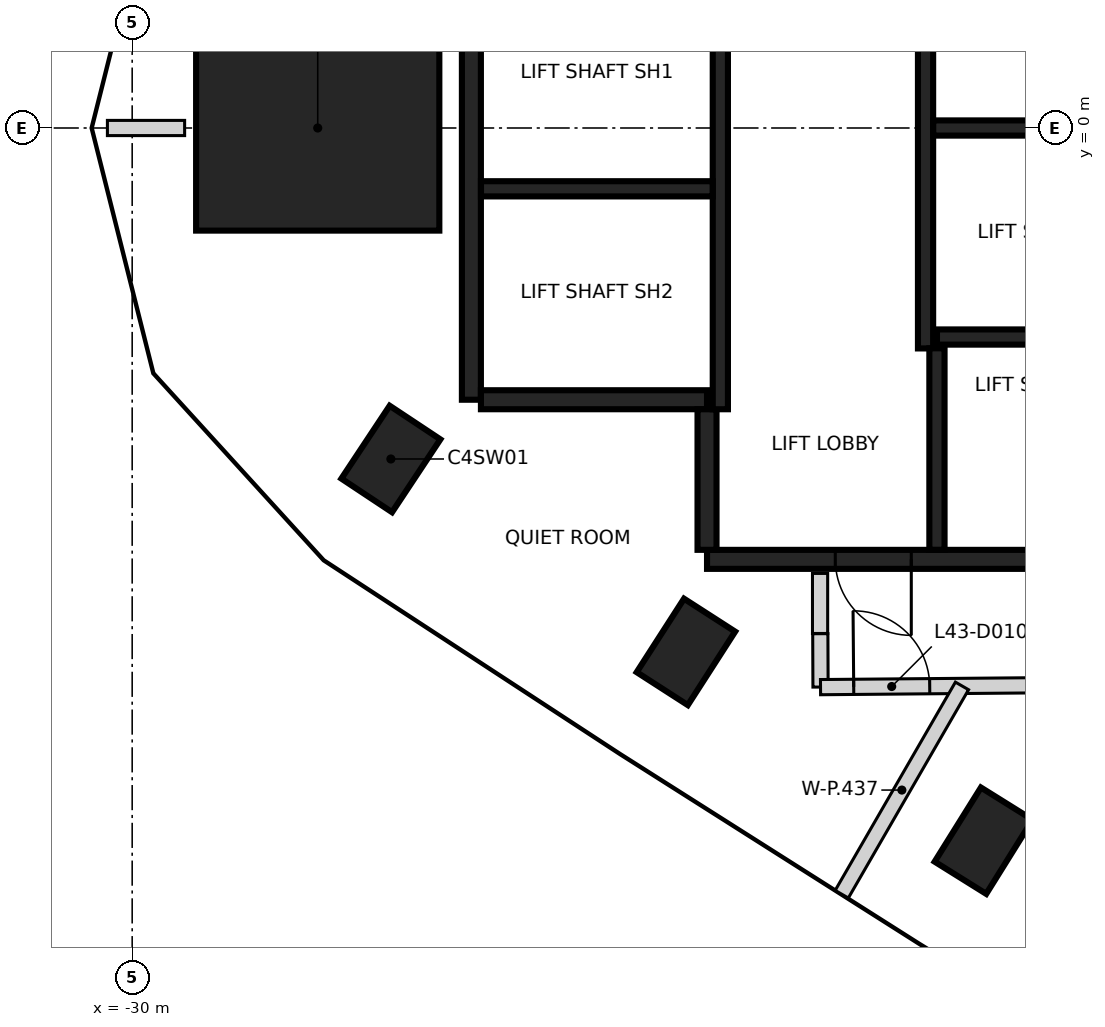
"""IFC4 building model, lengths in metres.
Left out: names, types, materials, properties, quantities, classifications, styles, units other than length and angle.
Written with IfcOpenShell. Run it as: python <this file> out.ifc"""

import sys

from ifc_helpers import new_model, si_unit, direction, frame, frame_2d, origin, origin_2d, place, context, subcontext, project, spatial, rectangle, extrude, element, fill, save


model = new_model("IFC4")
c1 = context("Model", 3, precision=1e-05, world=origin(), true_north=direction((0.0, 1.0)))
c2 = subcontext(c1, "Body", "Model", "MODEL_VIEW")
j1 = project(units=[si_unit("LENGTHUNIT", "METRE"), si_unit("PLANEANGLEUNIT", "RADIAN")], contexts=[c1])
p1 = place(None, origin())
s1 = spatial("IfcSite", under=j1, at=p1, CompositionType="ELEMENT")
p2 = place(p1, origin())
s2 = spatial("IfcBuilding", under=s1, at=p2, CompositionType="ELEMENT")
p3 = place(p2, frame((0.0, 0.0, 175.6)))
s3 = spatial("IfcBuildingStorey", under=s2, at=p3, CompositionType="ELEMENT", Elevation=175.6)
for number, where, z_axis, x_axis in (
    (1, (-26.597, -4.354, -0.35), (0.0, 0.0, 1.0), (0.553, 0.833, 0.0)),
    (2, (-22.715, -6.892, -0.35), (0.0, 0.0, 1.0), (0.541, 0.841, 0.0)),
    (3, (-18.799, -9.376, -0.35), (0.0, 0.0, 1.0), (0.529, 0.848, 0.0)),
):
    element("IfcColumn", number, at=place(p3, frame(where, z_axis=z_axis, x_axis=x_axis)), inside=s3, PredefinedType="COLUMN", context=c2, shape_type="SweptSolid", body=[
        extrude(rectangle(XDim=1.15, YDim=0.8, at=origin_2d()), origin(), (0.0, 0.0, 1.0), 3.6),
    ])
p4 = place(p3, frame((-27.559, 0.0, -0.35), z_axis=(0.0, 0.0, 1.0), x_axis=(1.0, 0.0, 0.0)))
e4 = element("IfcColumn", 4, at=p4, inside=s3, PredefinedType="COLUMN", context=c2, shape_type="SweptSolid", body=[
    extrude(rectangle(XDim=3.2, YDim=2.7, at=origin_2d()), origin(), (0.0, 0.0, 1.0), 3.6),
])
p5 = place(p3, frame((-16.187, -5.675, 0.0), z_axis=(0.0, 0.0, 1.0), x_axis=(-1.0, 0.0, 0.0)))
e5 = element("IfcWall", 5, at=p5, inside=s3, PredefinedType="SHEAR", context=c2, shape_type="SweptSolid", body=[
    extrude(rectangle(XDim=6.25, YDim=0.25, at=frame_2d((3.125, 0.0))), origin(), (0.0, 0.0, 1.0), 3.25),
])
p6 = place(p5, frame((3.563, 0.0, 0.0)))
e6 = element("IfcOpeningElement", 6, at=p6, cuts=e5, PredefinedType="OPENING", context=c2, shape_type="SweptSolid", body=[
    extrude(rectangle(XDim=1.0, YDim=2.1, at=frame_2d((0.5, 1.05))), frame((0.0, 0.135, 0.0), z_axis=(0.0, -1.0, 0.0), x_axis=(1.0, 0.0, 0.0)), (0.0, 0.0, 1.0), 0.27),
])
p7 = place(p3, frame((-25.537, -3.575, 0.0), z_axis=(0.0, 0.0, 1.0), x_axis=(0.0, 1.0, 0.0)))
e7 = element("IfcWall", 7, at=p7, inside=s3, PredefinedType="SHEAR", context=c2, shape_type="SweptSolid", body=[
    extrude(rectangle(XDim=5.85, YDim=0.25, at=frame_2d((2.925, 0.0))), origin(), (0.0, 0.0, 1.0), 3.25),
])
p8 = place(p3, frame((-22.437, -3.575, 0.0), z_axis=(0.0, 0.0, 1.0), x_axis=(-1.0, 0.0, 0.0)))
e8 = element("IfcWall", 8, at=p8, inside=s3, PredefinedType="SHEAR", context=c2, shape_type="SweptSolid", body=[
    extrude(rectangle(XDim=2.975, YDim=0.25, at=frame_2d((1.487, 0.0))), origin(), (0.0, 0.0, 1.0), 3.25),
])
p9 = place(p3, frame((-22.437, -5.55, 0.0), z_axis=(0.0, 0.0, 1.0), x_axis=(0.0, 1.0, 0.0)))
e9 = element("IfcWall", 9, at=p9, inside=s3, PredefinedType="SHEAR", context=c2, shape_type="SweptSolid", body=[
    extrude(rectangle(XDim=1.849, YDim=0.25, at=frame_2d((0.925, 0.0))), origin(), (0.0, 0.0, 1.0), 3.25),
])
for number, where, z_axis, x_axis in (
    (10, (-19.562, -2.9, 0.0), (0.0, 0.0, 1.0), (0.0, 1.0, 0.0)),
    (11, (-22.262, 2.4, 0.0), (0.0, 0.0, 1.0), (0.0, -1.0, 0.0)),
):
    element("IfcWall", number, at=place(p3, frame(where, z_axis=z_axis, x_axis=x_axis)), inside=s3, PredefinedType="SHEAR", context=c2, shape_type="SweptSolid", body=[
        extrude(rectangle(XDim=6.1, YDim=0.2, at=frame_2d((3.05, 0.0))), origin(), (0.0, 0.0, 1.0), 3.25),
    ])
p10 = place(p3, frame((-16.263, 0.0, 0.0), z_axis=(0.0, 0.0, 1.0), x_axis=(-1.0, 0.0, 0.0)))
e12 = element("IfcWall", 12, at=p10, inside=s3, PredefinedType="SHEAR", context=c2, shape_type="SweptSolid", body=[
    extrude(rectangle(XDim=3.198, YDim=0.2, at=frame_2d((1.599, 0.0))), origin(), (0.0, 0.0, 1.0), 3.25),
])
p11 = place(p3, frame((-22.363, -0.8, 0.0), z_axis=(0.0, 0.0, 1.0), x_axis=(-1.0, 0.0, 0.0)))
e13 = element("IfcWall", 13, at=p11, inside=s3, PredefinedType="SHEAR", context=c2, shape_type="SweptSolid", body=[
    extrude(rectangle(XDim=3.048, YDim=0.2, at=frame_2d((1.524, 0.0))), origin(), (0.0, 0.0, 1.0), 3.25),
])
p12 = place(p3, frame((-19.412, -2.75, 0.0), z_axis=(0.0, 0.0, 1.0), x_axis=(1.0, 0.0, 0.0)))
e14 = element("IfcWall", 14, at=p12, inside=s3, PredefinedType="SHEAR", context=c2, shape_type="SweptSolid", body=[
    extrude(rectangle(XDim=3.1, YDim=0.2, at=frame_2d((1.55, 0.0))), origin(), (0.0, 0.0, 1.0), 3.25),
])
p13 = place(p3, frame((-19.412, -5.549, 0.0), z_axis=(0.0, 0.0, 1.0), x_axis=(0.0, 1.0, 0.0)))
e15 = element("IfcWall", 15, at=p13, inside=s3, PredefinedType="SHEAR", context=c2, shape_type="SweptSolid", body=[
    extrude(rectangle(XDim=2.651, YDim=0.2, at=frame_2d((1.325, 0.0))), origin(), (0.0, 0.0, 1.0), 3.25),
])
p14 = place(p3, frame((-20.95, -6.65, 0.0), z_axis=(0.0, 0.0, 1.0), x_axis=(0.0, 1.0, 0.0)))
e16 = element("IfcWall", 16, at=p14, inside=s3, PredefinedType="PARTITIONING", context=c2, shape_type="SweptSolid", body=[
    extrude(rectangle(XDim=0.79, YDim=0.2, at=frame_2d((0.395, 0.0))), origin(), (0.0, 0.0, 1.0), 3.25),
])
p15 = place(p3, frame((-20.947, -6.653, 0.0), z_axis=(0.0, 0.0, 1.0), x_axis=(0.004173876686, -0.999991289339, 0.0)))
e17 = element("IfcWall", 17, at=p15, inside=s3, PredefinedType="PARTITIONING", context=c2, shape_type="SweptSolid", body=[
    extrude(rectangle(XDim=0.702, YDim=0.2, at=frame_2d((0.351, 0.0))), origin(), (0.0, 0.0, 1.0), 3.25),
])
p16 = place(p3, frame((-20.944, -7.356, 0.0), z_axis=(0.0, 0.0, 1.0), x_axis=(0.999963588164, 0.008533600955, 0.0)))
e18 = element("IfcWall", 18, at=p16, inside=s3, PredefinedType="PARTITIONING", context=c2, shape_type="SweptSolid", body=[
    extrude(rectangle(XDim=10.357, YDim=0.2, at=frame_2d((5.178, 0.0))), origin(), (0.0, 0.0, 1.0), 3.25),
])
p17 = place(p16, frame((0.437, 0.0, 0.0)))
e19 = element("IfcOpeningElement", 19, at=p17, cuts=e18, PredefinedType="OPENING", context=c2, shape_type="SweptSolid", body=[
    extrude(rectangle(XDim=1.0, YDim=2.1, at=frame_2d((0.5, 1.05))), frame((0.0, 0.11, 0.0), z_axis=(0.0, -1.0, 0.0), x_axis=(1.0, 0.0, 0.0)), (0.0, 0.0, 1.0), 0.22),
])
p18 = place(p16, frame((4.968, 0.0, 0.0)))
e20 = element("IfcOpeningElement", 20, at=p18, cuts=e18, PredefinedType="OPENING", context=c2, shape_type="SweptSolid", body=[
    extrude(rectangle(XDim=0.95, YDim=2.1, at=frame_2d((0.475, 1.05))), frame((0.0, 0.11, 0.0), z_axis=(0.0, -1.0, 0.0), x_axis=(1.0, 0.0, 0.0)), (0.0, 0.0, 1.0), 0.22),
])
p19 = place(p3, frame((-30.326, 0.0, 0.0), z_axis=(0.0, 0.0, 1.0), x_axis=(1.0, 0.0, 0.0)))
e21 = element("IfcWall", 21, at=p19, inside=s3, PredefinedType="PARTITIONING", context=c2, shape_type="SweptSolid", body=[
    extrude(rectangle(XDim=1.016, YDim=0.2, at=frame_2d((0.508, 0.0))), origin(), (0.0, 0.0, 1.0), 3.25),
])
p20 = place(p3, frame((-20.665, -10.08, 0.0), z_axis=(0.0, 0.0, 1.0), x_axis=(0.499931743679, 0.866064808003, 0.0)))
e22 = element("IfcWall", 22, at=p20, inside=s3, PredefinedType="PARTITIONING", context=c2, shape_type="SweptSolid", body=[
    extrude(rectangle(XDim=3.164, YDim=0.2, at=frame_2d((1.582, 0.0))), origin(), (0.0, 0.0, 1.0), 2.35),
])
p21 = place(p6, origin())
e23 = element("IfcDoor", 23, at=p21, inside=s3, OperationType="SINGLE_SWING_LEFT", PredefinedType="DOOR", context=c2, shape_type="SweptSolid", body=[
    extrude(rectangle(XDim=1.0, YDim=2.1, at=frame_2d((0.5, 1.05))), frame((0.0, 0.025, 0.0), z_axis=(0.0, -1.0, 0.0), x_axis=(1.0, 0.0, 0.0)), (0.0, 0.0, 1.0), 0.05),
])
fill(e6, e23)
p22 = place(p17, origin())
e24 = element("IfcDoor", 24, at=p22, inside=s3, OperationType="SINGLE_SWING_LEFT", PredefinedType="DOOR", context=c2, shape_type="SweptSolid", body=[
    extrude(rectangle(XDim=1.0, YDim=2.1, at=frame_2d((0.5, 1.05))), frame((0.0, 0.025, 0.0), z_axis=(0.0, -1.0, 0.0), x_axis=(1.0, 0.0, 0.0)), (0.0, 0.0, 1.0), 0.05),
])
fill(e19, e24)
save(model, sys.argv[1])
